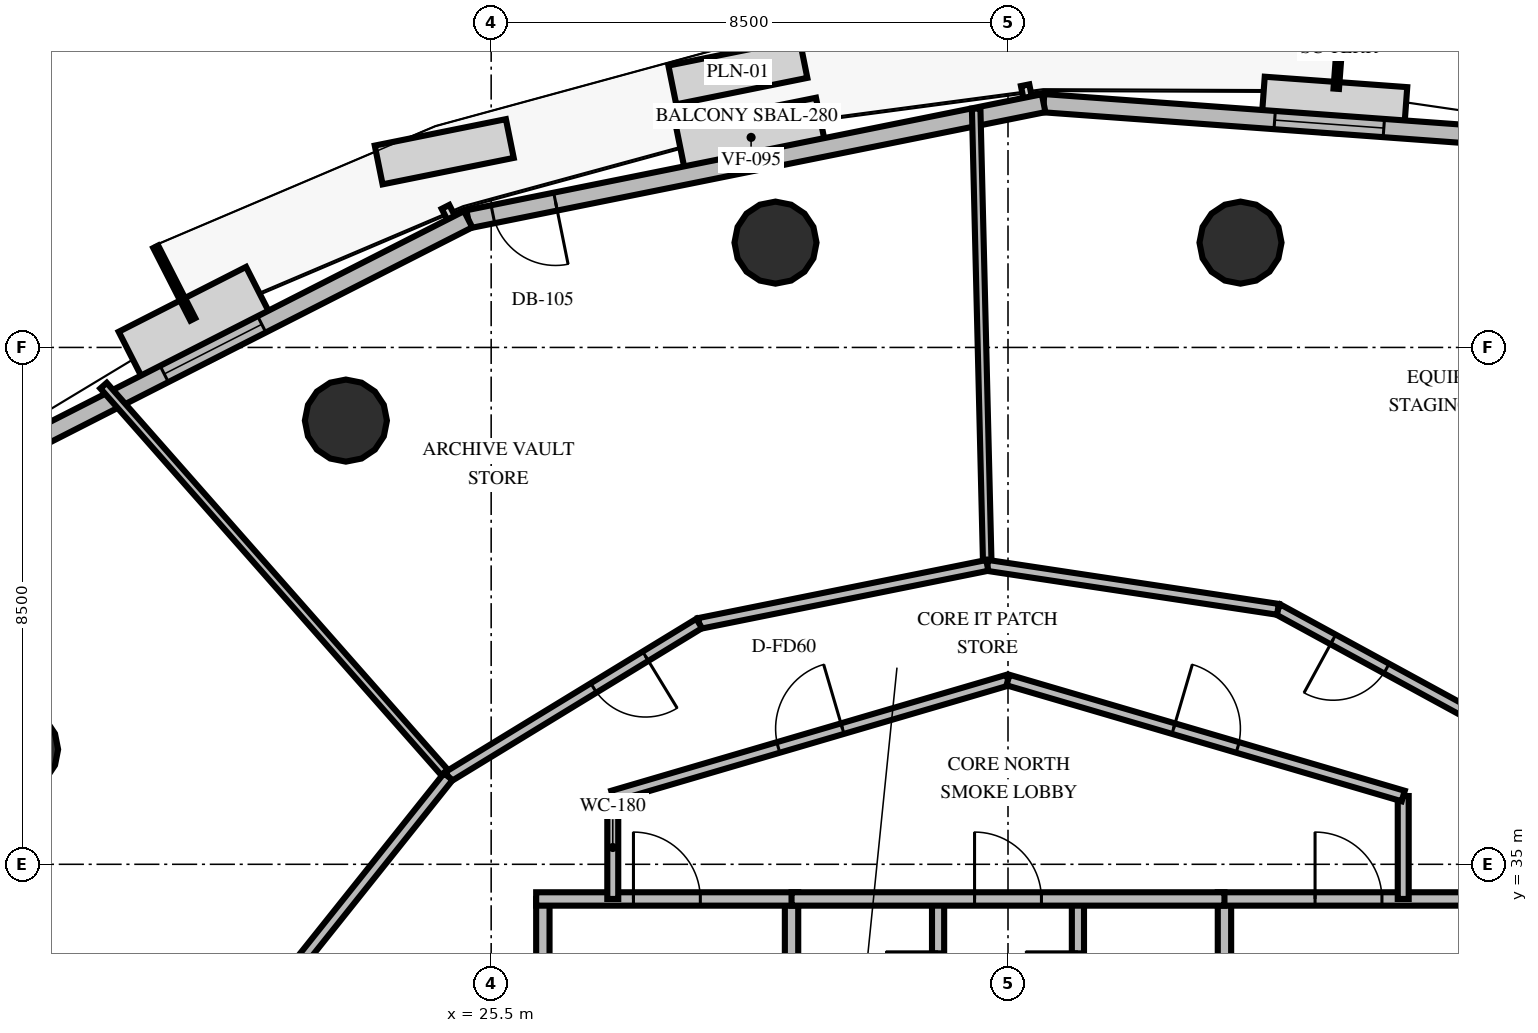
"""IFC4 building model, lengths in metres.
Left out: names, types, materials, properties, quantities, classifications, styles, units other than length and angle.
Written with IfcOpenShell. Run it as: python <this file> out.ifc"""

import sys

from ifc_helpers import new_model, si_unit, direction, frame, frame_2d, origin, origin_2d, place, context, subcontext, project, spatial, rectangle, circle, extrude, element, fill, save


model = new_model("IFC4")
c1 = context("Model", 3, precision=1e-05, world=origin(), true_north=direction((0.0, 1.0)))
c2 = subcontext(c1, "Body", "Model", "MODEL_VIEW")
j1 = project(units=[si_unit("LENGTHUNIT", "METRE"), si_unit("PLANEANGLEUNIT", "RADIAN")], contexts=[c1])
p1 = place(None, origin())
s1 = spatial("IfcSite", under=j1, at=p1, CompositionType="ELEMENT")
p2 = place(p1, origin())
s2 = spatial("IfcBuilding", under=s1, at=p2, CompositionType="ELEMENT")
p3 = place(p2, frame((0.0, 0.0, 80.4)))
s3 = spatial("IfcBuildingStorey", under=s2, at=p3, CompositionType="ELEMENT", Elevation=80.4)
for number, where, z_axis, x_axis in (
    (1, (37.824, 45.223, 0.0), (0.0, 0.0, 1.0), (1.0, 0.0, 0.0)),
    (2, (30.176, 45.223, 0.0), (0.0, 0.0, 1.0), (1.0, 0.0, 0.0)),
    (3, (23.111, 42.297, 0.0), (0.0, 0.0, 1.0), (1.0, 0.0, 0.0)),
    (4, (17.703, 36.889, 0.0), (0.0, 0.0, 1.0), (1.0, 0.0, 0.0)),
):
    element("IfcColumn", number, at=place(p3, frame(where, z_axis=z_axis, x_axis=x_axis)), inside=s3, PredefinedType="COLUMN", context=c2, shape_type="SweptSolid", body=[
        extrude(circle(Radius=0.675, at=origin_2d()), origin(), (0.0, 0.0, 1.0), 4.2),
    ])
p4 = place(p3, frame((43.98, 46.83, 0.0), z_axis=(0.0, 0.0, 1.0), x_axis=(-0.997338230912, 0.0729140121, 0.0)))
e5 = element("IfcWall", 5, at=p4, inside=s3, PredefinedType="SOLIDWALL", context=c2, shape_type="SweptSolid", body=[
    extrude(rectangle(XDim=9.419, YDim=0.3, at=frame_2d((4.709, 0.0))), origin(), (0.0, 0.0, 1.0), 3.0),
])
p5 = place(p4, frame((3.809, 0.0, 0.8)))
e6 = element("IfcOpeningElement", 6, at=p5, cuts=e5, PredefinedType="OPENING", context=c2, shape_type="SweptSolid", body=[
    extrude(rectangle(XDim=1.8, YDim=1.95, at=frame_2d((0.9, 0.975))), frame((0.0, 0.16, 0.0), z_axis=(0.0, -1.0, 0.0), x_axis=(1.0, 0.0, 0.0)), (0.0, 0.0, 1.0), 0.32),
])
p6 = place(p3, frame((34.586, 47.517, 0.0), z_axis=(0.0, 0.0, 1.0), x_axis=(-0.980274098215, -0.197642840418, 0.0)))
e7 = element("IfcWall", 7, at=p6, inside=s3, PredefinedType="SOLIDWALL", context=c2, shape_type="SweptSolid", body=[
    extrude(rectangle(XDim=9.655, YDim=0.3, at=frame_2d((4.827, 0.0))), origin(), (0.0, 0.0, 1.0), 3.0),
])
p7 = place(p6, frame((8.19, 0.0, 0.0)))
e8 = element("IfcOpeningElement", 8, at=p7, cuts=e7, PredefinedType="OPENING", context=c2, shape_type="SweptSolid", body=[
    extrude(rectangle(XDim=1.05, YDim=2.15, at=frame_2d((0.525, 1.075))), frame((0.0, 0.16, 0.0), z_axis=(0.0, -1.0, 0.0), x_axis=(1.0, 0.0, 0.0)), (0.0, 0.0, 1.0), 0.32),
])
p8 = place(p3, frame((25.122, 45.608, 0.0), z_axis=(0.0, 0.0, 1.0), x_axis=(-0.891142535662, -0.453723463284, 0.0)))
e9 = element("IfcWall", 9, at=p8, inside=s3, PredefinedType="SOLIDWALL", context=c2, shape_type="SweptSolid", body=[
    extrude(rectangle(XDim=9.419, YDim=0.3, at=frame_2d((4.709, 0.0))), origin(), (0.0, 0.0, 1.0), 3.0),
])
p9 = place(p8, frame((3.809, 0.0, 0.8)))
e10 = element("IfcOpeningElement", 10, at=p9, cuts=e9, PredefinedType="OPENING", context=c2, shape_type="SweptSolid", body=[
    extrude(rectangle(XDim=1.8, YDim=1.95, at=frame_2d((0.9, 0.975))), frame((0.0, 0.16, 0.0), z_axis=(0.0, -1.0, 0.0), x_axis=(1.0, 0.0, 0.0)), (0.0, 0.0, 1.0), 0.32),
])
p10 = place(p3, frame((26.35, 30.05, 0.0), z_axis=(0.0, 0.0, 1.0), x_axis=(0.0, 1.0, 0.0)))
e11 = element("IfcWall", 11, at=p10, inside=s3, PredefinedType="SOLIDWALL", context=c2, shape_type="SweptSolid", body=[
    extrude(rectangle(XDim=4.38, YDim=0.22, at=frame_2d((2.19, 0.0))), origin(), (0.0, 0.0, 1.0), 3.0),
])
p11 = place(p3, frame((30.44, 30.05, 0.0), z_axis=(0.0, 0.0, 1.0), x_axis=(0.0, 1.0, 0.0)))
e12 = element("IfcWall", 12, at=p11, inside=s3, PredefinedType="SOLIDWALL", context=c2, shape_type="SweptSolid", body=[
    extrude(rectangle(XDim=4.38, YDim=0.22, at=frame_2d((2.19, 0.0))), origin(), (0.0, 0.0, 1.0), 3.0),
])
p12 = place(p11, frame((0.8, 0.0, 0.0)))
e13 = element("IfcOpeningElement", 13, at=p12, cuts=e12, PredefinedType="OPENING", context=c2, shape_type="SweptSolid", body=[
    extrude(rectangle(XDim=1.05, YDim=2.1, at=frame_2d((0.525, 1.05))), frame((0.0, 0.12, 0.0), z_axis=(0.0, -1.0, 0.0), x_axis=(1.0, 0.0, 0.0)), (0.0, 0.0, 1.0), 0.24),
])
p13 = place(p3, frame((26.24, 34.43, 0.0), z_axis=(0.0, 0.0, 1.0), x_axis=(1.0, 0.0, 0.0)))
e14 = element("IfcWall", 14, at=p13, inside=s3, PredefinedType="SOLIDWALL", context=c2, shape_type="SweptSolid", body=[
    extrude(rectangle(XDim=4.31, YDim=0.22, at=frame_2d((2.155, 0.0))), origin(), (0.0, 0.0, 1.0), 3.0),
])
p14 = place(p13, frame((1.6, 0.0, 0.0)))
e15 = element("IfcOpeningElement", 15, at=p14, cuts=e14, PredefinedType="OPENING", context=c2, shape_type="SweptSolid", body=[
    extrude(rectangle(XDim=1.1, YDim=2.15, at=frame_2d((0.55, 1.075))), frame((0.0, 0.12, 0.0), z_axis=(0.0, -1.0, 0.0), x_axis=(1.0, 0.0, 0.0)), (0.0, 0.0, 1.0), 0.24),
])
p15 = place(p3, frame((32.85, 30.05, 0.0), z_axis=(0.0, 0.0, 1.0), x_axis=(0.0, 1.0, 0.0)))
e16 = element("IfcWall", 16, at=p15, inside=s3, PredefinedType="SOLIDWALL", context=c2, shape_type="SweptSolid", body=[
    extrude(rectangle(XDim=4.38, YDim=0.2, at=frame_2d((2.19, 0.0))), origin(), (0.0, 0.0, 1.0), 3.0),
])
p16 = place(p15, frame((2.65, 0.0, 0.0)))
e17 = element("IfcOpeningElement", 17, at=p16, cuts=e16, PredefinedType="OPENING", context=c2, shape_type="SweptSolid", body=[
    extrude(rectangle(XDim=0.86, YDim=2.05, at=frame_2d((0.43, 1.025))), frame((0.0, 0.11, 0.0), z_axis=(0.0, -1.0, 0.0), x_axis=(1.0, 0.0, 0.0)), (0.0, 0.0, 1.0), 0.22),
])
p17 = place(p3, frame((37.56, 30.05, 0.0), z_axis=(0.0, 0.0, 1.0), x_axis=(0.0, 1.0, 0.0)))
e18 = element("IfcWall", 18, at=p17, inside=s3, PredefinedType="SOLIDWALL", context=c2, shape_type="SweptSolid", body=[
    extrude(rectangle(XDim=4.38, YDim=0.22, at=frame_2d((2.19, 0.0))), origin(), (0.0, 0.0, 1.0), 3.0),
])
p18 = place(p17, frame((0.8, 0.0, 0.0)))
e19 = element("IfcOpeningElement", 19, at=p18, cuts=e18, PredefinedType="OPENING", context=c2, shape_type="SweptSolid", body=[
    extrude(rectangle(XDim=1.05, YDim=2.1, at=frame_2d((0.525, 1.05))), frame((0.0, 0.12, 0.0), z_axis=(0.0, -1.0, 0.0), x_axis=(1.0, 0.0, 0.0)), (0.0, 0.0, 1.0), 0.24),
])
p19 = place(p3, frame((37.45, 34.43, 0.0), z_axis=(0.0, 0.0, 1.0), x_axis=(1.0, 0.0, 0.0)))
e20 = element("IfcWall", 20, at=p19, inside=s3, PredefinedType="SOLIDWALL", context=c2, shape_type="SweptSolid", body=[
    extrude(rectangle(XDim=4.31, YDim=0.22, at=frame_2d((2.155, 0.0))), origin(), (0.0, 0.0, 1.0), 3.0),
])
p20 = place(p19, frame((1.6, 0.0, 0.0)))
e21 = element("IfcOpeningElement", 21, at=p20, cuts=e20, PredefinedType="OPENING", context=c2, shape_type="SweptSolid", body=[
    extrude(rectangle(XDim=1.1, YDim=2.15, at=frame_2d((0.55, 1.075))), frame((0.0, 0.12, 0.0), z_axis=(0.0, -1.0, 0.0), x_axis=(1.0, 0.0, 0.0)), (0.0, 0.0, 1.0), 0.24),
])
p21 = place(p3, frame((35.15, 30.05, 0.0), z_axis=(0.0, 0.0, 1.0), x_axis=(0.0, 1.0, 0.0)))
e22 = element("IfcWall", 22, at=p21, inside=s3, PredefinedType="SOLIDWALL", context=c2, shape_type="SweptSolid", body=[
    extrude(rectangle(XDim=4.38, YDim=0.2, at=frame_2d((2.19, 0.0))), origin(), (0.0, 0.0, 1.0), 3.0),
])
p22 = place(p21, frame((2.65, 0.0, 0.0)))
e23 = element("IfcOpeningElement", 23, at=p22, cuts=e22, PredefinedType="OPENING", context=c2, shape_type="SweptSolid", body=[
    extrude(rectangle(XDim=0.86, YDim=2.05, at=frame_2d((0.43, 1.025))), frame((0.0, 0.11, 0.0), z_axis=(0.0, -1.0, 0.0), x_axis=(1.0, 0.0, 0.0)), (0.0, 0.0, 1.0), 0.22),
])
p23 = place(p3, frame((30.44, 34.43, 0.0), z_axis=(0.0, 0.0, 1.0), x_axis=(1.0, 0.0, 0.0)))
e24 = element("IfcWall", 24, at=p23, inside=s3, PredefinedType="SOLIDWALL", context=c2, shape_type="SweptSolid", body=[
    extrude(rectangle(XDim=7.12, YDim=0.22, at=frame_2d((3.56, 0.0))), origin(), (0.0, 0.0, 1.0), 3.0),
])
p24 = place(p23, frame((3.01, 0.0, 0.0)))
e25 = element("IfcOpeningElement", 25, at=p24, cuts=e24, PredefinedType="OPENING", context=c2, shape_type="SweptSolid", body=[
    extrude(rectangle(XDim=1.1, YDim=2.15, at=frame_2d((0.55, 1.075))), frame((0.0, 0.12, 0.0), z_axis=(0.0, -1.0, 0.0), x_axis=(1.0, 0.0, 0.0)), (0.0, 0.0, 1.0), 0.24),
])
for number, where, z_axis, x_axis in (
    (26, (27.5, 34.43, 0.0), (0.0, 0.0, 1.0), (0.0, 1.0, 0.0)),
    (27, (40.5, 36.123, 0.0), (0.0, 0.0, 1.0), (0.0, -1.0, 0.0)),
):
    element("IfcWall", number, at=place(p3, frame(where, z_axis=z_axis, x_axis=x_axis)), inside=s3, PredefinedType="PARTITIONING", context=c2, shape_type="SweptSolid", body=[
        extrude(rectangle(XDim=1.693, YDim=0.18, at=frame_2d((0.846, 0.0))), origin(), (0.0, 0.0, 1.0), 3.0),
    ])
p25 = place(p3, frame((27.5, 36.123, 0.0), z_axis=(0.0, 0.0, 1.0), x_axis=(0.959546654541, 0.281549671923, 0.0)))
e28 = element("IfcWall", 28, at=p25, inside=s3, PredefinedType="PARTITIONING", context=c2, shape_type="SweptSolid", body=[
    extrude(rectangle(XDim=6.774, YDim=0.18, at=frame_2d((3.387, 0.0))), origin(), (0.0, 0.0, 1.0), 3.0),
])
p26 = place(p25, frame((2.837, 0.0, 0.0)))
e29 = element("IfcOpeningElement", 29, at=p26, cuts=e28, PredefinedType="OPENING", context=c2, shape_type="SweptSolid", body=[
    extrude(rectangle(XDim=1.1, YDim=2.15, at=frame_2d((0.55, 1.075))), frame((0.0, 0.1, 0.0), z_axis=(0.0, -1.0, 0.0), x_axis=(1.0, 0.0, 0.0)), (0.0, 0.0, 1.0), 0.2),
])
p27 = place(p3, frame((34.0, 38.03, 0.0), z_axis=(0.0, 0.0, 1.0), x_axis=(0.959546654541, -0.281549671923, 0.0)))
e30 = element("IfcWall", 30, at=p27, inside=s3, PredefinedType="PARTITIONING", context=c2, shape_type="SweptSolid", body=[
    extrude(rectangle(XDim=6.774, YDim=0.18, at=frame_2d((3.387, 0.0))), origin(), (0.0, 0.0, 1.0), 3.0),
])
p28 = place(p27, frame((2.837, 0.0, 0.0)))
e31 = element("IfcOpeningElement", 31, at=p28, cuts=e30, PredefinedType="OPENING", context=c2, shape_type="SweptSolid", body=[
    extrude(rectangle(XDim=1.1, YDim=2.15, at=frame_2d((0.55, 1.075))), frame((0.0, 0.1, 0.0), z_axis=(0.0, -1.0, 0.0), x_axis=(1.0, 0.0, 0.0)), (0.0, 0.0, 1.0), 0.2),
])
p29 = place(p3, frame((33.66, 39.916, 0.0), z_axis=(0.0, 0.0, 1.0), x_axis=(-0.02443368086, 0.999701453055, 0.0)))
e32 = element("IfcWall", 32, at=p29, inside=s3, PredefinedType="PARTITIONING", context=c2, shape_type="SweptSolid", body=[
    extrude(rectangle(XDim=7.514, YDim=0.14, at=frame_2d((3.757, 0.0))), origin(), (0.0, 0.0, 1.0), 3.0),
])
p30 = place(p3, frame((42.684, 36.879, 0.0), z_axis=(0.0, 0.0, 1.0), x_axis=(-0.877995916426, 0.478668121708, 0.0)))
e33 = element("IfcWall", 33, at=p30, inside=s3, PredefinedType="PARTITIONING", context=c2, shape_type="SweptSolid", body=[
    extrude(rectangle(XDim=4.834, YDim=0.18, at=frame_2d((2.417, 0.0))), origin(), (0.0, 0.0, 1.0), 3.0),
])
p31 = place(p30, frame((2.801, 0.0, 0.0)))
e34 = element("IfcOpeningElement", 34, at=p31, cuts=e33, PredefinedType="OPENING", context=c2, shape_type="SweptSolid", body=[
    extrude(rectangle(XDim=1.0, YDim=2.15, at=frame_2d((0.5, 1.075))), frame((0.0, 0.1, 0.0), z_axis=(0.0, -1.0, 0.0), x_axis=(1.0, 0.0, 0.0)), (0.0, 0.0, 1.0), 0.2),
])
p32 = place(p3, frame((38.44, 39.193, 0.0), z_axis=(0.0, 0.0, 1.0), x_axis=(-0.988756719699, 0.149533104195, 0.0)))
e35 = element("IfcWall", 35, at=p32, inside=s3, PredefinedType="PARTITIONING", context=c2, shape_type="SweptSolid", body=[
    extrude(rectangle(XDim=4.834, YDim=0.18, at=frame_2d((2.417, 0.0))), origin(), (0.0, 0.0, 1.0), 3.0),
])
p33 = place(p3, frame((24.794, 36.441, 0.0), z_axis=(0.0, 0.0, 1.0), x_axis=(-0.661298505741, 0.750122847475, 0.0)))
e36 = element("IfcWall", 36, at=p33, inside=s3, PredefinedType="PARTITIONING", context=c2, shape_type="SweptSolid", body=[
    extrude(rectangle(XDim=8.573, YDim=0.14, at=frame_2d((4.286, 0.0))), origin(), (0.0, 0.0, 1.0), 3.0),
])
p34 = place(p3, frame((33.66, 39.916, 0.0), z_axis=(0.0, 0.0, 1.0), x_axis=(-0.980270628178, -0.197660050419, 0.0)))
e37 = element("IfcWall", 37, at=p34, inside=s3, PredefinedType="PARTITIONING", context=c2, shape_type="SweptSolid", body=[
    extrude(rectangle(XDim=4.834, YDim=0.18, at=frame_2d((2.417, 0.0))), origin(), (0.0, 0.0, 1.0), 3.0),
])
p35 = place(p3, frame((28.921, 38.96, 0.0), z_axis=(0.0, 0.0, 1.0), x_axis=(-0.853551355644, -0.521008717085, 0.0)))
e38 = element("IfcWall", 38, at=p35, inside=s3, PredefinedType="PARTITIONING", context=c2, shape_type="SweptSolid", body=[
    extrude(rectangle(XDim=4.834, YDim=0.18, at=frame_2d((2.417, 0.0))), origin(), (0.0, 0.0, 1.0), 3.0),
])
p36 = place(p35, frame((1.034, 0.0, 0.0)))
e39 = element("IfcOpeningElement", 39, at=p36, cuts=e38, PredefinedType="OPENING", context=c2, shape_type="SweptSolid", body=[
    extrude(rectangle(XDim=1.0, YDim=2.15, at=frame_2d((0.5, 1.075))), frame((0.0, 0.1, 0.0), z_axis=(0.0, -1.0, 0.0), x_axis=(1.0, 0.0, 0.0)), (0.0, 0.0, 1.0), 0.2),
])
p37 = place(p3, frame((24.794, 36.441, 0.0), z_axis=(0.0, 0.0, 1.0), x_axis=(-0.623863242023, -0.781533527913, 0.0)))
e40 = element("IfcWall", 40, at=p37, inside=s3, PredefinedType="PARTITIONING", context=c2, shape_type="SweptSolid", body=[
    extrude(rectangle(XDim=4.834, YDim=0.18, at=frame_2d((2.417, 0.0))), origin(), (0.0, 0.0, 1.0), 3.0),
])
p38 = place(p5, origin())
e41 = element("IfcWindow", 41, at=p38, inside=s3, PartitioningType="SINGLE_PANEL", PredefinedType="WINDOW", context=c2, shape_type="SweptSolid", body=[
    extrude(rectangle(XDim=1.8, YDim=1.95, at=frame_2d((0.9, 0.975))), frame((0.0, 0.03, 0.0), z_axis=(0.0, -1.0, 0.0), x_axis=(1.0, 0.0, 0.0)), (0.0, 0.0, 1.0), 0.06),
])
fill(e6, e41)
p39 = place(p7, origin())
e42 = element("IfcDoor", 42, at=p39, inside=s3, OperationType="SINGLE_SWING_LEFT", PredefinedType="DOOR", context=c2, shape_type="SweptSolid", body=[
    extrude(rectangle(XDim=1.05, YDim=2.15, at=frame_2d((0.525, 1.075))), frame((0.0, 0.025, 0.0), z_axis=(0.0, -1.0, 0.0), x_axis=(1.0, 0.0, 0.0)), (0.0, 0.0, 1.0), 0.05),
])
fill(e8, e42)
p40 = place(p9, origin())
e43 = element("IfcWindow", 43, at=p40, inside=s3, PartitioningType="SINGLE_PANEL", PredefinedType="WINDOW", context=c2, shape_type="SweptSolid", body=[
    extrude(rectangle(XDim=1.8, YDim=1.95, at=frame_2d((0.9, 0.975))), frame((0.0, 0.03, 0.0), z_axis=(0.0, -1.0, 0.0), x_axis=(1.0, 0.0, 0.0)), (0.0, 0.0, 1.0), 0.06),
])
fill(e10, e43)
p41 = place(p14, origin())
e44 = element("IfcDoor", 44, at=p41, inside=s3, OperationType="SINGLE_SWING_LEFT", PredefinedType="DOOR", context=c2, shape_type="SweptSolid", body=[
    extrude(rectangle(XDim=1.1, YDim=2.15, at=frame_2d((0.55, 1.075))), frame((0.0, 0.025, 0.0), z_axis=(0.0, -1.0, 0.0), x_axis=(1.0, 0.0, 0.0)), (0.0, 0.0, 1.0), 0.05),
])
fill(e15, e44)
p42 = place(p16, origin())
e45 = element("IfcDoor", 45, at=p42, inside=s3, OperationType="SINGLE_SWING_RIGHT", PredefinedType="TRAPDOOR", context=c2, shape_type="SweptSolid", body=[
    extrude(rectangle(XDim=0.86, YDim=2.05, at=frame_2d((0.43, 1.025))), frame((0.0, 0.025, 0.0), z_axis=(0.0, -1.0, 0.0), x_axis=(1.0, 0.0, 0.0)), (0.0, 0.0, 1.0), 0.05),
])
fill(e17, e45)
p43 = place(p20, origin())
e46 = element("IfcDoor", 46, at=p43, inside=s3, OperationType="SINGLE_SWING_LEFT", PredefinedType="DOOR", context=c2, shape_type="SweptSolid", body=[
    extrude(rectangle(XDim=1.1, YDim=2.15, at=frame_2d((0.55, 1.075))), frame((0.0, 0.025, 0.0), z_axis=(0.0, -1.0, 0.0), x_axis=(1.0, 0.0, 0.0)), (0.0, 0.0, 1.0), 0.05),
])
fill(e21, e46)
p44 = place(p22, origin())
e47 = element("IfcDoor", 47, at=p44, inside=s3, OperationType="SINGLE_SWING_RIGHT", PredefinedType="TRAPDOOR", context=c2, shape_type="SweptSolid", body=[
    extrude(rectangle(XDim=0.86, YDim=2.05, at=frame_2d((0.43, 1.025))), frame((0.0, 0.025, 0.0), z_axis=(0.0, -1.0, 0.0), x_axis=(1.0, 0.0, 0.0)), (0.0, 0.0, 1.0), 0.05),
])
fill(e23, e47)
p45 = place(p24, origin())
e48 = element("IfcDoor", 48, at=p45, inside=s3, OperationType="SINGLE_SWING_LEFT", PredefinedType="DOOR", context=c2, shape_type="SweptSolid", body=[
    extrude(rectangle(XDim=1.1, YDim=2.15, at=frame_2d((0.55, 1.075))), frame((0.0, 0.025, 0.0), z_axis=(0.0, -1.0, 0.0), x_axis=(1.0, 0.0, 0.0)), (0.0, 0.0, 1.0), 0.05),
])
fill(e25, e48)
p46 = place(p26, origin())
e49 = element("IfcDoor", 49, at=p46, inside=s3, OperationType="SINGLE_SWING_RIGHT", PredefinedType="DOOR", context=c2, shape_type="SweptSolid", body=[
    extrude(rectangle(XDim=1.1, YDim=2.15, at=frame_2d((0.55, 1.075))), frame((0.0, 0.025, 0.0), z_axis=(0.0, -1.0, 0.0), x_axis=(1.0, 0.0, 0.0)), (0.0, 0.0, 1.0), 0.05),
])
fill(e29, e49)
p47 = place(p28, origin())
e50 = element("IfcDoor", 50, at=p47, inside=s3, OperationType="SINGLE_SWING_LEFT", PredefinedType="DOOR", context=c2, shape_type="SweptSolid", body=[
    extrude(rectangle(XDim=1.1, YDim=2.15, at=frame_2d((0.55, 1.075))), frame((0.0, 0.025, 0.0), z_axis=(0.0, -1.0, 0.0), x_axis=(1.0, 0.0, 0.0)), (0.0, 0.0, 1.0), 0.05),
])
fill(e31, e50)
p48 = place(p31, origin())
e51 = element("IfcDoor", 51, at=p48, inside=s3, OperationType="SINGLE_SWING_RIGHT", PredefinedType="DOOR", context=c2, shape_type="SweptSolid", body=[
    extrude(rectangle(XDim=1.0, YDim=2.15, at=frame_2d((0.5, 1.075))), frame((0.0, 0.025, 0.0), z_axis=(0.0, -1.0, 0.0), x_axis=(1.0, 0.0, 0.0)), (0.0, 0.0, 1.0), 0.05),
])
fill(e34, e51)
p49 = place(p36, origin())
e52 = element("IfcDoor", 52, at=p49, inside=s3, OperationType="SINGLE_SWING_LEFT", PredefinedType="DOOR", context=c2, shape_type="SweptSolid", body=[
    extrude(rectangle(XDim=1.0, YDim=2.15, at=frame_2d((0.5, 1.075))), frame((0.0, 0.025, 0.0), z_axis=(0.0, -1.0, 0.0), x_axis=(1.0, 0.0, 0.0)), (0.0, 0.0, 1.0), 0.05),
])
fill(e39, e52)
save(model, sys.argv[1])
